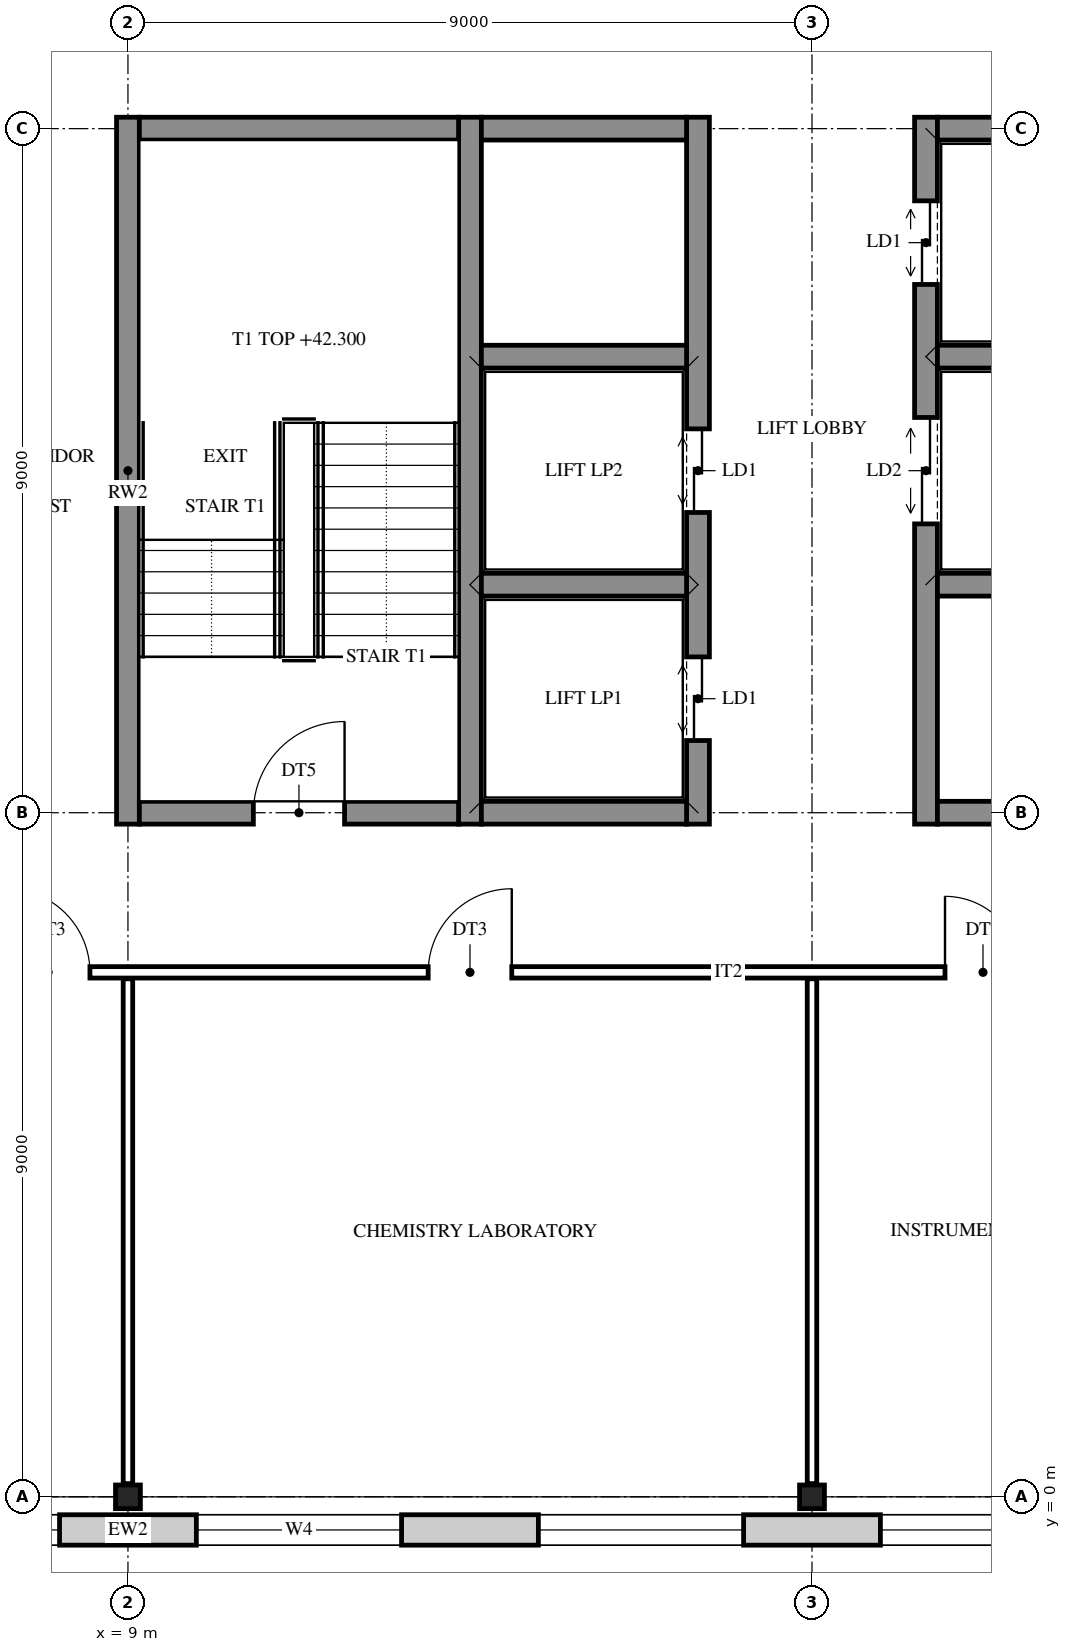
"""IFC4 building model, lengths in metres.
Left out: names, types, materials, properties, quantities, classifications, styles, units other than length and angle.
Written with IfcOpenShell. Run it as: python <this file> out.ifc"""

import sys

from ifc_helpers import new_model, si_unit, direction, frame, frame_2d, origin, origin_2d, place, context, subcontext, project, spatial, rectangle, i_section, extrude, element, fill, save


model = new_model("IFC4")
c1 = context("Model", 3, precision=1e-05, world=origin(), true_north=direction((0.0, 1.0)))
c2 = subcontext(c1, "Body", "Model", "MODEL_VIEW")
j1 = project(units=[si_unit("LENGTHUNIT", "METRE"), si_unit("PLANEANGLEUNIT", "RADIAN")], contexts=[c1])
p1 = place(None, origin())
s1 = spatial("IfcSite", under=j1, at=p1, CompositionType="ELEMENT")
p2 = place(p1, origin())
s2 = spatial("IfcBuilding", under=s1, at=p2, CompositionType="ELEMENT")
p3 = place(p2, frame((0.0, 0.0, 40.2)))
s3 = spatial("IfcBuildingStorey", under=s2, at=p3, CompositionType="ELEMENT", Elevation=40.2)
for number, where, z_axis, x_axis in (
    (1, (9.0, 0.0, 0.0), (0.0, 0.0, 1.0), (0.0, 1.0, 0.0)),
    (2, (18.0, 0.0, 0.0), (0.0, 0.0, 1.0), (0.0, 1.0, 0.0)),
):
    element("IfcColumn", number, at=place(p3, frame(where, z_axis=z_axis, x_axis=x_axis)), inside=s3, PredefinedType="COLUMN", context=c2, shape_type="SweptSolid", body=[
        extrude(i_section(OverallWidth=0.311, OverallDepth=0.327, WebThickness=0.016, FlangeThickness=0.025, FilletRadius=0.017, at=origin_2d()), origin(), (0.0, 0.0, 1.0), 4.2),
    ])
for number, where, z_axis, x_axis in (
    (3, (9.0, 8.85, 0.0), (0.0, 0.0, 1.0), (0.0, 1.0, 0.0)),
    (4, (13.5, 8.85, 0.0), (0.0, 0.0, 1.0), (0.0, 1.0, 0.0)),
):
    element("IfcWall", number, at=place(p3, frame(where, z_axis=z_axis, x_axis=x_axis)), inside=s3, PredefinedType="SHEAR", context=c2, shape_type="SweptSolid", body=[
        extrude(rectangle(XDim=9.3, YDim=0.3, at=frame_2d((4.65, 0.0))), origin(), (0.0, 0.0, 1.0), 4.2),
    ])
p4 = place(p3, frame((16.5, 8.85, 0.0), z_axis=(0.0, 0.0, 1.0), x_axis=(0.0, 1.0, 0.0)))
e5 = element("IfcWall", 5, at=p4, inside=s3, PredefinedType="SHEAR", context=c2, shape_type="SweptSolid", body=[
    extrude(rectangle(XDim=9.3, YDim=0.3, at=frame_2d((4.65, 0.0))), origin(), (0.0, 0.0, 1.0), 4.2),
])
p5 = place(p4, frame((1.1, 0.0, 0.0)))
e6 = element("IfcOpeningElement", 6, at=p5, cuts=e5, PredefinedType="OPENING", context=c2, shape_type="SweptSolid", body=[
    extrude(rectangle(XDim=1.1, YDim=2.1, at=frame_2d((0.55, 1.05))), frame((0.0, 0.16, 0.0), z_axis=(0.0, -1.0, 0.0), x_axis=(1.0, 0.0, 0.0)), (0.0, 0.0, 1.0), 0.32),
])
p6 = place(p4, frame((4.1, 0.0, 0.0)))
e7 = element("IfcOpeningElement", 7, at=p6, cuts=e5, PredefinedType="OPENING", context=c2, shape_type="SweptSolid", body=[
    extrude(rectangle(XDim=1.1, YDim=2.1, at=frame_2d((0.55, 1.05))), frame((0.0, 0.16, 0.0), z_axis=(0.0, -1.0, 0.0), x_axis=(1.0, 0.0, 0.0)), (0.0, 0.0, 1.0), 0.32),
])
p7 = place(p3, frame((19.5, 8.85, 0.0), z_axis=(0.0, 0.0, 1.0), x_axis=(0.0, 1.0, 0.0)))
e8 = element("IfcWall", 8, at=p7, inside=s3, PredefinedType="SHEAR", context=c2, shape_type="SweptSolid", body=[
    extrude(rectangle(XDim=9.3, YDim=0.3, at=frame_2d((4.65, 0.0))), origin(), (0.0, 0.0, 1.0), 4.2),
])
p8 = place(p7, frame((3.95, 0.0, 0.0)))
e9 = element("IfcOpeningElement", 9, at=p8, cuts=e8, PredefinedType="OPENING", context=c2, shape_type="SweptSolid", body=[
    extrude(rectangle(XDim=1.4, YDim=2.1, at=frame_2d((0.7, 1.05))), frame((0.0, 0.16, 0.0), z_axis=(0.0, -1.0, 0.0), x_axis=(1.0, 0.0, 0.0)), (0.0, 0.0, 1.0), 0.32),
])
p9 = place(p7, frame((7.1, 0.0, 0.0)))
e10 = element("IfcOpeningElement", 10, at=p9, cuts=e8, PredefinedType="OPENING", context=c2, shape_type="SweptSolid", body=[
    extrude(rectangle(XDim=1.1, YDim=2.1, at=frame_2d((0.55, 1.05))), frame((0.0, 0.16, 0.0), z_axis=(0.0, -1.0, 0.0), x_axis=(1.0, 0.0, 0.0)), (0.0, 0.0, 1.0), 0.32),
])
p10 = place(p3, frame((9.15, 9.0, 0.0), z_axis=(0.0, 0.0, 1.0), x_axis=(1.0, 0.0, 0.0)))
e11 = element("IfcWall", 11, at=p10, inside=s3, PredefinedType="SHEAR", context=c2, shape_type="SweptSolid", body=[
    extrude(rectangle(XDim=4.2, YDim=0.3, at=frame_2d((2.1, 0.0))), origin(), (0.0, 0.0, 1.0), 4.2),
])
p11 = place(p10, frame((1.5, 0.0, 0.0)))
e12 = element("IfcOpeningElement", 12, at=p11, cuts=e11, PredefinedType="OPENING", context=c2, shape_type="SweptSolid", body=[
    extrude(rectangle(XDim=1.2, YDim=2.1, at=frame_2d((0.6, 1.05))), frame((0.0, 0.16, 0.0), z_axis=(0.0, -1.0, 0.0), x_axis=(1.0, 0.0, 0.0)), (0.0, 0.0, 1.0), 0.32),
])
for number, where, z_axis, x_axis in (
    (13, (13.65, 9.0, 0.0), (0.0, 0.0, 1.0), (1.0, 0.0, 0.0)),
    (14, (19.65, 9.0, 0.0), (0.0, 0.0, 1.0), (1.0, 0.0, 0.0)),
    (15, (13.65, 12.0, 0.0), (0.0, 0.0, 1.0), (1.0, 0.0, 0.0)),
    (16, (19.65, 12.0, 0.0), (0.0, 0.0, 1.0), (1.0, 0.0, 0.0)),
    (17, (13.65, 15.0, 0.0), (0.0, 0.0, 1.0), (1.0, 0.0, 0.0)),
    (18, (19.65, 15.0, 0.0), (0.0, 0.0, 1.0), (1.0, 0.0, 0.0)),
):
    element("IfcWall", number, at=place(p3, frame(where, z_axis=z_axis, x_axis=x_axis)), inside=s3, PredefinedType="SHEAR", context=c2, shape_type="SweptSolid", body=[
        extrude(rectangle(XDim=2.7, YDim=0.3, at=frame_2d((1.35, 0.0))), origin(), (0.0, 0.0, 1.0), 4.2),
    ])
p12 = place(p3, frame((9.15, 18.0, 0.0), z_axis=(0.0, 0.0, 1.0), x_axis=(1.0, 0.0, 0.0)))
e19 = element("IfcWall", 19, at=p12, inside=s3, PredefinedType="SHEAR", context=c2, shape_type="SweptSolid", body=[
    extrude(rectangle(XDim=4.2, YDim=0.3, at=frame_2d((2.1, 0.0))), origin(), (0.0, 0.0, 1.0), 4.2),
])
for number, where, z_axis, x_axis in (
    (20, (13.65, 18.0, 0.0), (0.0, 0.0, 1.0), (1.0, 0.0, 0.0)),
    (21, (19.65, 18.0, 0.0), (0.0, 0.0, 1.0), (1.0, 0.0, 0.0)),
):
    element("IfcWall", number, at=place(p3, frame(where, z_axis=z_axis, x_axis=x_axis)), inside=s3, PredefinedType="SHEAR", context=c2, shape_type="SweptSolid", body=[
        extrude(rectangle(XDim=2.7, YDim=0.3, at=frame_2d((1.35, 0.0))), origin(), (0.0, 0.0, 1.0), 4.2),
    ])
p13 = place(p3, frame((32.125, -0.436, 0.0), z_axis=(0.0, 0.0, 1.0), x_axis=(-1.0, 0.0, 0.0)))
e22 = element("IfcWall", 22, at=p13, inside=s3, PredefinedType="STANDARD", context=c2, shape_type="SweptSolid", body=[
    extrude(rectangle(XDim=32.75, YDim=0.4, at=frame_2d((16.375, 0.0))), origin(), (0.0, 0.0, 1.0), 4.2),
])
p14 = place(p13, frame((28.525, 0.0, 0.9)))
e23 = element("IfcOpeningElement", 23, at=p14, cuts=e22, PredefinedType="OPENING", context=c2, shape_type="SweptSolid", body=[
    extrude(rectangle(XDim=2.7, YDim=2.5, at=frame_2d((1.35, 1.25))), frame((0.0, 0.21, 0.0), z_axis=(0.0, -1.0, 0.0), x_axis=(1.0, 0.0, 0.0)), (0.0, 0.0, 1.0), 0.42),
])
p15 = place(p13, frame((24.025, 0.0, 0.9)))
e24 = element("IfcOpeningElement", 24, at=p15, cuts=e22, PredefinedType="OPENING", context=c2, shape_type="SweptSolid", body=[
    extrude(rectangle(XDim=2.7, YDim=2.5, at=frame_2d((1.35, 1.25))), frame((0.0, 0.21, 0.0), z_axis=(0.0, -1.0, 0.0), x_axis=(1.0, 0.0, 0.0)), (0.0, 0.0, 1.0), 0.42),
])
p16 = place(p13, frame((19.525, 0.0, 0.9)))
e25 = element("IfcOpeningElement", 25, at=p16, cuts=e22, PredefinedType="OPENING", context=c2, shape_type="SweptSolid", body=[
    extrude(rectangle(XDim=2.7, YDim=2.5, at=frame_2d((1.35, 1.25))), frame((0.0, 0.21, 0.0), z_axis=(0.0, -1.0, 0.0), x_axis=(1.0, 0.0, 0.0)), (0.0, 0.0, 1.0), 0.42),
])
p17 = place(p13, frame((15.025, 0.0, 0.9)))
e26 = element("IfcOpeningElement", 26, at=p17, cuts=e22, PredefinedType="OPENING", context=c2, shape_type="SweptSolid", body=[
    extrude(rectangle(XDim=2.7, YDim=2.5, at=frame_2d((1.35, 1.25))), frame((0.0, 0.21, 0.0), z_axis=(0.0, -1.0, 0.0), x_axis=(1.0, 0.0, 0.0)), (0.0, 0.0, 1.0), 0.42),
])
p18 = place(p13, frame((10.525, 0.0, 0.9)))
e27 = element("IfcOpeningElement", 27, at=p18, cuts=e22, PredefinedType="OPENING", context=c2, shape_type="SweptSolid", body=[
    extrude(rectangle(XDim=2.7, YDim=2.5, at=frame_2d((1.35, 1.25))), frame((0.0, 0.21, 0.0), z_axis=(0.0, -1.0, 0.0), x_axis=(1.0, 0.0, 0.0)), (0.0, 0.0, 1.0), 0.42),
])
p19 = place(p13, frame((6.025, 0.0, 0.9)))
e28 = element("IfcOpeningElement", 28, at=p19, cuts=e22, PredefinedType="OPENING", context=c2, shape_type="SweptSolid", body=[
    extrude(rectangle(XDim=2.7, YDim=2.5, at=frame_2d((1.35, 1.25))), frame((0.0, 0.21, 0.0), z_axis=(0.0, -1.0, 0.0), x_axis=(1.0, 0.0, 0.0)), (0.0, 0.0, 1.0), 0.42),
])
p20 = place(p13, frame((1.525, 0.0, 0.9)))
e29 = element("IfcOpeningElement", 29, at=p20, cuts=e22, PredefinedType="OPENING", context=c2, shape_type="SweptSolid", body=[
    extrude(rectangle(XDim=2.7, YDim=2.5, at=frame_2d((1.35, 1.25))), frame((0.0, 0.21, 0.0), z_axis=(0.0, -1.0, 0.0), x_axis=(1.0, 0.0, 0.0)), (0.0, 0.0, 1.0), 0.42),
])
for number, where, z_axis, x_axis in (
    (30, (9.0, 0.174, 0.0), (0.0, 0.0, 1.0), (0.0, 1.0, 0.0)),
    (31, (18.0, 0.174, 0.0), (0.0, 0.0, 1.0), (0.0, 1.0, 0.0)),
):
    element("IfcWall", number, at=place(p3, frame(where, z_axis=z_axis, x_axis=x_axis)), inside=s3, PredefinedType="PARTITIONING", context=c2, shape_type="SweptSolid", body=[
        extrude(rectangle(XDim=6.641, YDim=0.125, at=frame_2d((3.321, 0.0))), origin(), (0.0, 0.0, 1.0), 3.537),
    ])
p21 = place(p3, frame((6.9, 6.9, 0.0), z_axis=(0.0, 0.0, 1.0), x_axis=(1.0, 0.0, 0.0)))
e32 = element("IfcWall", 32, at=p21, inside=s3, PredefinedType="PARTITIONING", context=c2, shape_type="SweptSolid", body=[
    extrude(rectangle(XDim=20.1, YDim=0.15, at=frame_2d((10.05, 0.0))), origin(), (0.0, 0.0, 1.0), 3.537),
])
p22 = place(p21, frame((0.5, 0.0, 0.0)))
e33 = element("IfcOpeningElement", 33, at=p22, cuts=e32, PredefinedType="OPENING", context=c2, shape_type="SweptSolid", body=[
    extrude(rectangle(XDim=1.1, YDim=2.1, at=frame_2d((0.55, 1.05))), frame((0.0, 0.085, 0.0), z_axis=(0.0, -1.0, 0.0), x_axis=(1.0, 0.0, 0.0)), (0.0, 0.0, 1.0), 0.17),
])
p23 = place(p21, frame((6.05, 0.0, 0.0)))
e34 = element("IfcOpeningElement", 34, at=p23, cuts=e32, PredefinedType="OPENING", context=c2, shape_type="SweptSolid", body=[
    extrude(rectangle(XDim=1.1, YDim=2.1, at=frame_2d((0.55, 1.05))), frame((0.0, 0.085, 0.0), z_axis=(0.0, -1.0, 0.0), x_axis=(1.0, 0.0, 0.0)), (0.0, 0.0, 1.0), 0.17),
])
p24 = place(p21, frame((12.85, 0.0, 0.0)))
e35 = element("IfcOpeningElement", 35, at=p24, cuts=e32, PredefinedType="OPENING", context=c2, shape_type="SweptSolid", body=[
    extrude(rectangle(XDim=1.0, YDim=2.1, at=frame_2d((0.5, 1.05))), frame((0.0, 0.085, 0.0), z_axis=(0.0, -1.0, 0.0), x_axis=(1.0, 0.0, 0.0)), (0.0, 0.0, 1.0), 0.17),
])
p25 = place(p21, frame((18.55, 0.0, 0.0)))
e36 = element("IfcOpeningElement", 36, at=p25, cuts=e32, PredefinedType="OPENING", context=c2, shape_type="SweptSolid", body=[
    extrude(rectangle(XDim=1.0, YDim=2.1, at=frame_2d((0.5, 1.05))), frame((0.0, 0.085, 0.0), z_axis=(0.0, -1.0, 0.0), x_axis=(1.0, 0.0, 0.0)), (0.0, 0.0, 1.0), 0.17),
])
p26 = place(p15, origin())
e37 = element("IfcWindow", 37, at=p26, inside=s3, PartitioningType="SINGLE_PANEL", PredefinedType="WINDOW", context=c2, shape_type="SweptSolid", body=[
    extrude(rectangle(XDim=2.7, YDim=2.5, at=frame_2d((1.35, 1.25))), frame((0.0, 0.03, 0.0), z_axis=(0.0, -1.0, 0.0), x_axis=(1.0, 0.0, 0.0)), (0.0, 0.0, 1.0), 0.06),
])
fill(e24, e37)
p27 = place(p16, origin())
e38 = element("IfcWindow", 38, at=p27, inside=s3, PartitioningType="SINGLE_PANEL", PredefinedType="WINDOW", context=c2, shape_type="SweptSolid", body=[
    extrude(rectangle(XDim=2.7, YDim=2.5, at=frame_2d((1.35, 1.25))), frame((0.0, 0.03, 0.0), z_axis=(0.0, -1.0, 0.0), x_axis=(1.0, 0.0, 0.0)), (0.0, 0.0, 1.0), 0.06),
])
fill(e25, e38)
p28 = place(p17, origin())
e39 = element("IfcWindow", 39, at=p28, inside=s3, PartitioningType="SINGLE_PANEL", PredefinedType="WINDOW", context=c2, shape_type="SweptSolid", body=[
    extrude(rectangle(XDim=2.7, YDim=2.5, at=frame_2d((1.35, 1.25))), frame((0.0, 0.03, 0.0), z_axis=(0.0, -1.0, 0.0), x_axis=(1.0, 0.0, 0.0)), (0.0, 0.0, 1.0), 0.06),
])
fill(e26, e39)
p29 = place(p18, origin())
e40 = element("IfcWindow", 40, at=p29, inside=s3, PartitioningType="SINGLE_PANEL", PredefinedType="WINDOW", context=c2, shape_type="SweptSolid", body=[
    extrude(rectangle(XDim=2.7, YDim=2.5, at=frame_2d((1.35, 1.25))), frame((0.0, 0.03, 0.0), z_axis=(0.0, -1.0, 0.0), x_axis=(1.0, 0.0, 0.0)), (0.0, 0.0, 1.0), 0.06),
])
fill(e27, e40)
p30 = place(p11, origin())
e41 = element("IfcDoor", 41, at=p30, inside=s3, OperationType="SINGLE_SWING_RIGHT", PredefinedType="DOOR", context=c2, shape_type="SweptSolid", body=[
    extrude(rectangle(XDim=1.2, YDim=2.1, at=frame_2d((0.6, 1.05))), frame((0.0, 0.025, 0.0), z_axis=(0.0, -1.0, 0.0), x_axis=(1.0, 0.0, 0.0)), (0.0, 0.0, 1.0), 0.05),
])
fill(e12, e41)
p31 = place(p22, frame((1.1, 0.0, 0.0), z_axis=(0.0, 0.0, 1.0), x_axis=(-1.0, 0.0, 0.0)))
e42 = element("IfcDoor", 42, at=p31, inside=s3, OperationType="SINGLE_SWING_LEFT", PredefinedType="DOOR", context=c2, shape_type="SweptSolid", body=[
    extrude(rectangle(XDim=1.1, YDim=2.1, at=frame_2d((0.55, 1.05))), frame((0.0, 0.025, 0.0), z_axis=(0.0, -1.0, 0.0), x_axis=(1.0, 0.0, 0.0)), (0.0, 0.0, 1.0), 0.05),
])
fill(e33, e42)
p32 = place(p23, frame((1.1, 0.0, 0.0), z_axis=(0.0, 0.0, 1.0), x_axis=(-1.0, 0.0, 0.0)))
e43 = element("IfcDoor", 43, at=p32, inside=s3, OperationType="SINGLE_SWING_RIGHT", PredefinedType="DOOR", context=c2, shape_type="SweptSolid", body=[
    extrude(rectangle(XDim=1.1, YDim=2.1, at=frame_2d((0.55, 1.05))), frame((0.0, 0.025, 0.0), z_axis=(0.0, -1.0, 0.0), x_axis=(1.0, 0.0, 0.0)), (0.0, 0.0, 1.0), 0.05),
])
fill(e34, e43)
p33 = place(p24, frame((1.0, 0.0, 0.0), z_axis=(0.0, 0.0, 1.0), x_axis=(-1.0, 0.0, 0.0)))
e44 = element("IfcDoor", 44, at=p33, inside=s3, OperationType="SINGLE_SWING_LEFT", PredefinedType="DOOR", context=c2, shape_type="SweptSolid", body=[
    extrude(rectangle(XDim=1.0, YDim=2.1, at=frame_2d((0.5, 1.05))), frame((0.0, 0.025, 0.0), z_axis=(0.0, -1.0, 0.0), x_axis=(1.0, 0.0, 0.0)), (0.0, 0.0, 1.0), 0.05),
])
fill(e35, e44)
p34 = place(p5, origin())
e45 = element("IfcDoor", 45, at=p34, inside=s3, OperationType="DOUBLE_DOOR_SLIDING", PredefinedType="DOOR", context=c2, shape_type="SweptSolid", body=[
    extrude(rectangle(XDim=1.1, YDim=2.1, at=frame_2d((0.55, 1.05))), frame((0.0, 0.025, 0.0), z_axis=(0.0, -1.0, 0.0), x_axis=(1.0, 0.0, 0.0)), (0.0, 0.0, 1.0), 0.05),
])
fill(e6, e45)
p35 = place(p6, origin())
e46 = element("IfcDoor", 46, at=p35, inside=s3, OperationType="DOUBLE_DOOR_SLIDING", PredefinedType="DOOR", context=c2, shape_type="SweptSolid", body=[
    extrude(rectangle(XDim=1.1, YDim=2.1, at=frame_2d((0.55, 1.05))), frame((0.0, 0.025, 0.0), z_axis=(0.0, -1.0, 0.0), x_axis=(1.0, 0.0, 0.0)), (0.0, 0.0, 1.0), 0.05),
])
fill(e7, e46)
p36 = place(p8, origin())
e47 = element("IfcDoor", 47, at=p36, inside=s3, OperationType="DOUBLE_DOOR_SLIDING", PredefinedType="DOOR", context=c2, shape_type="SweptSolid", body=[
    extrude(rectangle(XDim=1.4, YDim=2.1, at=frame_2d((0.7, 1.05))), frame((0.0, 0.025, 0.0), z_axis=(0.0, -1.0, 0.0), x_axis=(1.0, 0.0, 0.0)), (0.0, 0.0, 1.0), 0.05),
])
fill(e9, e47)
p37 = place(p9, origin())
e48 = element("IfcDoor", 48, at=p37, inside=s3, OperationType="DOUBLE_DOOR_SLIDING", PredefinedType="DOOR", context=c2, shape_type="SweptSolid", body=[
    extrude(rectangle(XDim=1.1, YDim=2.1, at=frame_2d((0.55, 1.05))), frame((0.0, 0.025, 0.0), z_axis=(0.0, -1.0, 0.0), x_axis=(1.0, 0.0, 0.0)), (0.0, 0.0, 1.0), 0.05),
])
fill(e10, e48)
save(model, sys.argv[1])
